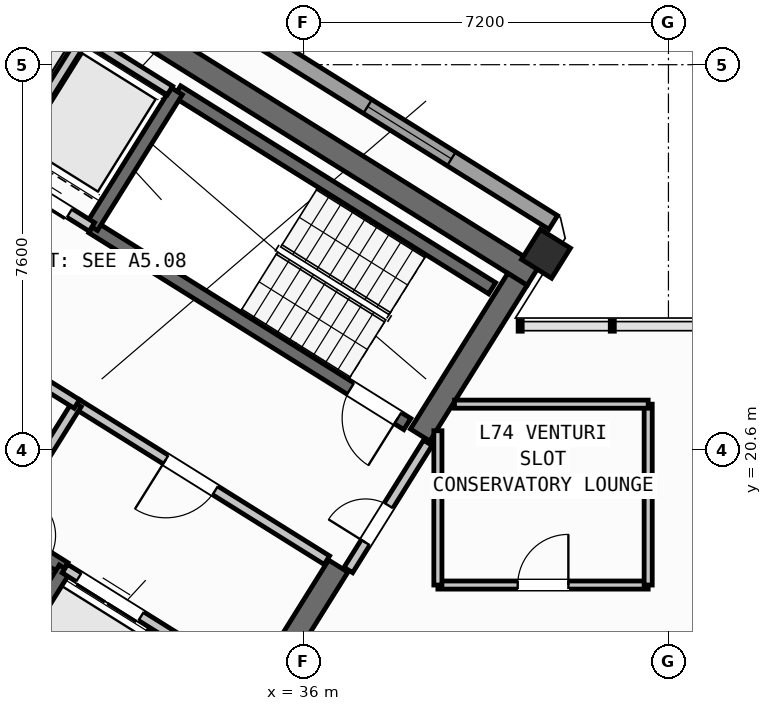
"""IFC4 building model, lengths in metres.
Left out: names, types, materials, properties, quantities, classifications, styles, units other than length and angle.
Written with IfcOpenShell. Run it as: python <this file> out.ifc"""

import sys

from ifc_helpers import new_model, si_unit, direction, frame, frame_2d, origin, origin_2d, place, context, subcontext, project, spatial, rectangle, hollow_rectangle, extrude, source, transform, mapped, element, fill, save


model = new_model("IFC4")
c1 = context("Model", 3, precision=1e-05, world=origin(), true_north=direction((0.0, 1.0)))
c2 = subcontext(c1, "Body", "Model", "MODEL_VIEW")
j1 = project(units=[si_unit("LENGTHUNIT", "METRE"), si_unit("PLANEANGLEUNIT", "RADIAN")], contexts=[c1])
p1 = place(None, origin())
s1 = spatial("IfcSite", under=j1, at=p1, CompositionType="ELEMENT")
p2 = place(p1, origin())
s2 = spatial("IfcBuilding", under=s1, at=p2, CompositionType="ELEMENT")
p3 = place(p2, frame((0.0, 0.0, 291.6)))
s3 = spatial("IfcBuildingStorey", under=s2, at=p3, CompositionType="ELEMENT", Elevation=291.6)
p4 = place(p3, frame((40.531, 24.036, 0.0), z_axis=(0.0, 0.0, 1.0), x_axis=(-0.848048787466, 0.529918157905, 0.0)))
e1 = element("IfcWall", 1, at=p4, inside=s3, PredefinedType="SHEAR", context=c2, shape_type="SweptSolid", body=[
    extrude(rectangle(XDim=13.04, YDim=0.45, at=frame_2d((6.52, 0.0))), origin(), (0.0, 0.0, 1.0), 3.35),
])
p5 = place(p3, frame((33.324, 12.503, 0.0), z_axis=(0.0, 0.0, 1.0), x_axis=(-0.848043529849, 0.529926571782, 0.0)))
e2 = element("IfcWall", 2, at=p5, inside=s3, PredefinedType="SHEAR", context=c2, shape_type="SweptSolid", body=[
    extrude(rectangle(XDim=13.04, YDim=0.45, at=frame_2d((6.52, 0.0))), origin(), (0.0, 0.0, 1.0), 3.35),
])
p6 = place(p3, frame((40.221, 23.965, 0.0), z_axis=(0.0, 0.0, 1.0), x_axis=(-0.529902075036, -0.848058836916, 0.0)))
e3 = element("IfcWall", 3, at=p6, inside=s3, PredefinedType="SHEAR", context=c2, shape_type="SweptSolid", body=[
    extrude(rectangle(XDim=3.625, YDim=0.45, at=frame_2d((1.812, 0.0))), origin(), (0.0, 0.0, 1.0), 3.35),
])
p7 = place(p3, frame((36.683, 18.304, 0.0), z_axis=(0.0, 0.0, 1.0), x_axis=(-0.529904039071, -0.848057609704, 0.0)))
e4 = element("IfcWall", 4, at=p7, inside=s3, PredefinedType="SHEAR", context=c2, shape_type="SweptSolid", body=[
    extrude(rectangle(XDim=6.475, YDim=0.45, at=frame_2d((3.238, 0.0))), origin(), (0.0, 0.0, 1.0), 3.35),
])
m1 = source(origin(), c2, "Body", "SweptSolid", [
    extrude(hollow_rectangle(XDim=0.7, YDim=0.7, WallThickness=0.028, at=origin_2d()), origin(), (0.0, 0.0, 1.0), 3.6),
])
p8 = place(p3, frame((40.783, 24.469, 0.0), z_axis=(0.0, 0.0, 1.0), x_axis=(-0.848048096156, 0.529919264233, 0.0)))
e5 = element("IfcColumn", 5, at=p8, inside=s3, PredefinedType="COLUMN", context=c2, shape_type="MappedRepresentation", body=[
    mapped(m1, transform((0.0, 0.0, 0.0), scale=1.0)),
])
p9 = place(p3, frame((19.566, 38.434, 0.0), z_axis=(0.0, 0.0, 1.0), x_axis=(0.84804567626, -0.529923136858, 0.0)))
e6 = element("IfcWall", 6, at=p9, inside=s3, PredefinedType="STANDARD", context=c2, shape_type="SweptSolid", body=[
    extrude(rectangle(XDim=25.188, YDim=0.32, at=frame_2d((12.594, 0.0))), origin(), (0.0, 0.0, 1.0), 3.35),
])
p10 = place(p9, frame((3.55, 0.0, 0.0)))
e7 = element("IfcOpeningElement", 7, at=p10, cuts=e6, PredefinedType="OPENING", context=c2, shape_type="SweptSolid", body=[
    extrude(rectangle(XDim=1.05, YDim=2.15, at=frame_2d((0.525, 1.075))), frame((0.0, 0.17, 0.0), z_axis=(0.0, -1.0, 0.0), x_axis=(1.0, 0.0, 0.0)), (0.0, 0.0, 1.0), 0.34),
])
p11 = place(p9, frame((7.349, 0.0, 0.9)))
e8 = element("IfcOpeningElement", 8, at=p11, cuts=e6, PredefinedType="OPENING", context=c2, shape_type="SweptSolid", body=[
    extrude(rectangle(XDim=1.65, YDim=1.45, at=frame_2d((0.825, 0.725))), frame((0.0, 0.17, 0.0), z_axis=(0.0, -1.0, 0.0), x_axis=(1.0, 0.0, 0.0)), (0.0, 0.0, 1.0), 0.34),
])
p12 = place(p9, frame((10.754, 0.0, 1.0)))
e9 = element("IfcOpeningElement", 9, at=p12, cuts=e6, PredefinedType="OPENING", context=c2, shape_type="SweptSolid", body=[
    extrude(rectangle(XDim=0.9, YDim=1.25, at=frame_2d((0.45, 0.625))), frame((0.0, 0.17, 0.0), z_axis=(0.0, -1.0, 0.0), x_axis=(1.0, 0.0, 0.0)), (0.0, 0.0, 1.0), 0.34),
])
p13 = place(p9, frame((15.169, 0.0, 0.95)))
e10 = element("IfcOpeningElement", 10, at=p13, cuts=e6, PredefinedType="OPENING", context=c2, shape_type="SweptSolid", body=[
    extrude(rectangle(XDim=1.95, YDim=1.35, at=frame_2d((0.975, 0.675))), frame((0.0, 0.17, 0.0), z_axis=(0.0, -1.0, 0.0), x_axis=(1.0, 0.0, 0.0)), (0.0, 0.0, 1.0), 0.34),
])
p14 = place(p9, frame((20.869, 0.0, 0.95)))
e11 = element("IfcOpeningElement", 11, at=p14, cuts=e6, PredefinedType="OPENING", context=c2, shape_type="SweptSolid", body=[
    extrude(rectangle(XDim=1.95, YDim=1.35, at=frame_2d((0.975, 0.675))), frame((0.0, 0.17, 0.0), z_axis=(0.0, -1.0, 0.0), x_axis=(1.0, 0.0, 0.0)), (0.0, 0.0, 1.0), 0.34),
])
p15 = place(p3, frame((31.28, 18.261, 0.0), z_axis=(0.0, 0.0, 1.0), x_axis=(-0.848051618787, 0.529913626805, 0.0)))
e12 = element("IfcWall", 12, at=p15, inside=s3, PredefinedType="SHEAR", context=c2, shape_type="SweptSolid", body=[
    extrude(rectangle(XDim=7.46, YDim=0.26, at=frame_2d((3.73, 0.0))), origin(), (0.0, 0.0, 1.0), 3.35),
])
p16 = place(p15, frame((0.36, 0.0, 0.0)))
e13 = element("IfcOpeningElement", 13, at=p16, cuts=e12, PredefinedType="OPENING", context=c2, shape_type="SweptSolid", body=[
    extrude(rectangle(XDim=0.86, YDim=2.05, at=frame_2d((0.43, 1.025))), frame((0.0, 0.14, 0.0), z_axis=(0.0, -1.0, 0.0), x_axis=(1.0, 0.0, 0.0)), (0.0, 0.0, 1.0), 0.28),
])
p17 = place(p3, frame((31.288, 18.256, 0.0), z_axis=(0.0, 0.0, 1.0), x_axis=(-0.529943379326, -0.848033026897, 0.0)))
e14 = element("IfcWall", 14, at=p17, inside=s3, PredefinedType="SHEAR", context=c2, shape_type="SweptSolid", body=[
    extrude(rectangle(XDim=3.16, YDim=0.26, at=frame_2d((1.58, 0.0))), origin(), (0.0, 0.0, 1.0), 3.35),
])
p18 = place(p3, frame((39.721, 23.788, 0.0), z_axis=(0.0, 0.0, 1.0), x_axis=(-0.848054434086, 0.529909121291, 0.0)))
e15 = element("IfcWall", 15, at=p18, inside=s3, PredefinedType="SHEAR", context=c2, shape_type="SweptSolid", body=[
    extrude(rectangle(XDim=7.33, YDim=0.26, at=frame_2d((3.665, 0.0))), origin(), (0.0, 0.0, 1.0), 3.35),
])
p19 = place(p3, frame((38.046, 21.108, 0.0), z_axis=(0.0, 0.0, 1.0), x_axis=(-0.848054434086, 0.529909121291, 0.0)))
e16 = element("IfcWall", 16, at=p19, inside=s3, PredefinedType="SHEAR", context=c2, shape_type="SweptSolid", body=[
    extrude(rectangle(XDim=7.33, YDim=0.26, at=frame_2d((3.665, 0.0))), origin(), (0.0, 0.0, 1.0), 3.35),
])
p20 = place(p19, frame((0.22, 0.0, 0.0)))
e17 = element("IfcOpeningElement", 17, at=p20, cuts=e16, PredefinedType="OPENING", context=c2, shape_type="SweptSolid", body=[
    extrude(rectangle(XDim=1.1, YDim=2.1, at=frame_2d((0.55, 1.05))), frame((0.0, 0.14, 0.0), z_axis=(0.0, -1.0, 0.0), x_axis=(1.0, 0.0, 0.0)), (0.0, 0.0, 1.0), 0.28),
])
p21 = place(p3, frame((33.496, 27.677, 0.0), z_axis=(0.0, 0.0, 1.0), x_axis=(-0.529908658664, -0.84805472316, 0.0)))
e18 = element("IfcWall", 18, at=p21, inside=s3, PredefinedType="SHEAR", context=c2, shape_type="SweptSolid", body=[
    extrude(rectangle(XDim=3.16, YDim=0.26, at=frame_2d((1.58, 0.0))), origin(), (0.0, 0.0, 1.0), 3.35),
])
p22 = place(p3, frame((34.933, 15.978, 0.0), z_axis=(0.0, 0.0, 1.0), x_axis=(-0.848055739377, 0.529907032327, 0.0)))
e19 = element("IfcWall", 19, at=p22, inside=s3, PredefinedType="STANDARD", context=c2, shape_type="SweptSolid", body=[
    extrude(rectangle(XDim=4.298, YDim=0.2, at=frame_2d((2.149, 0.0))), origin(), (0.0, 0.0, 1.0), 3.34),
])
p23 = place(p22, frame((0.448, 0.0, 0.0)))
e20 = element("IfcOpeningElement", 20, at=p23, cuts=e19, PredefinedType="OPENING", context=c2, shape_type="SweptSolid", body=[
    extrude(rectangle(XDim=1.3, YDim=2.2, at=frame_2d((0.65, 1.1))), frame((0.0, 0.11, 0.0), z_axis=(0.0, -1.0, 0.0), x_axis=(1.0, 0.0, 0.0)), (0.0, 0.0, 1.0), 0.22),
])
p24 = place(p22, frame((2.523, 0.0, 0.0)))
e21 = element("IfcOpeningElement", 21, at=p24, cuts=e19, PredefinedType="OPENING", context=c2, shape_type="SweptSolid", body=[
    extrude(rectangle(XDim=1.45, YDim=2.25, at=frame_2d((0.725, 1.125))), frame((0.0, 0.11, 0.0), z_axis=(0.0, -1.0, 0.0), x_axis=(1.0, 0.0, 0.0)), (0.0, 0.0, 1.0), 0.22),
])
p25 = place(p3, frame((36.459, 18.421, 0.0), z_axis=(0.0, 0.0, 1.0), x_axis=(-0.848059591691, 0.529900867089, 0.0)))
e22 = element("IfcWall", 22, at=p25, inside=s3, PredefinedType="STANDARD", context=c2, shape_type="SweptSolid", body=[
    extrude(rectangle(XDim=5.818, YDim=0.2, at=frame_2d((2.909, 0.0))), origin(), (0.0, 0.0, 1.0), 3.34),
])
p26 = place(p25, frame((2.598, 0.0, 0.0)))
e23 = element("IfcOpeningElement", 23, at=p26, cuts=e22, PredefinedType="OPENING", context=c2, shape_type="SweptSolid", body=[
    extrude(rectangle(XDim=1.15, YDim=2.1, at=frame_2d((0.575, 1.05))), frame((0.0, 0.11, 0.0), z_axis=(0.0, -1.0, 0.0), x_axis=(1.0, 0.0, 0.0)), (0.0, 0.0, 1.0), 0.22),
])
p27 = place(p3, frame((31.822, 24.998, 0.0), z_axis=(0.0, 0.0, 1.0), x_axis=(-0.848054125777, 0.529909614701, 0.0)))
e24 = element("IfcWall", 24, at=p27, inside=s3, PredefinedType="STANDARD", context=c2, shape_type="SweptSolid", body=[
    extrude(rectangle(XDim=4.668, YDim=0.2, at=frame_2d((2.334, 0.0))), origin(), (0.0, 0.0, 1.0), 3.34),
])
p28 = place(p27, frame((0.52, 0.0, 0.0)))
e25 = element("IfcOpeningElement", 25, at=p28, cuts=e24, PredefinedType="OPENING", context=c2, shape_type="SweptSolid", body=[
    extrude(rectangle(XDim=1.2, YDim=2.15, at=frame_2d((0.6, 1.075))), frame((0.0, 0.11, 0.0), z_axis=(0.0, -1.0, 0.0), x_axis=(1.0, 0.0, 0.0)), (0.0, 0.0, 1.0), 0.22),
])
p29 = place(p27, frame((2.54, 0.0, 0.0)))
e26 = element("IfcOpeningElement", 26, at=p29, cuts=e24, PredefinedType="OPENING", context=c2, shape_type="SweptSolid", body=[
    extrude(rectangle(XDim=1.2, YDim=2.15, at=frame_2d((0.6, 1.075))), frame((0.0, 0.11, 0.0), z_axis=(0.0, -1.0, 0.0), x_axis=(1.0, 0.0, 0.0)), (0.0, 0.0, 1.0), 0.22),
])
p30 = place(p3, frame((33.029, 17.003, 0.0), z_axis=(0.0, 0.0, 1.0), x_axis=(-0.529916267533, -0.848049968695, 0.0)))
e27 = element("IfcWall", 27, at=p30, inside=s3, PredefinedType="STANDARD", context=c2, shape_type="SweptSolid", body=[
    extrude(rectangle(XDim=2.92, YDim=0.2, at=frame_2d((1.46, 0.0))), origin(), (0.0, 0.0, 1.0), 3.34),
])
p31 = place(p3, frame((31.645, 28.716, 0.0), z_axis=(0.0, 0.0, 1.0), x_axis=(-0.52986693015, -0.848080795876, 0.0)))
e28 = element("IfcWall", 28, at=p31, inside=s3, PredefinedType="STANDARD", context=c2, shape_type="SweptSolid", body=[
    extrude(rectangle(XDim=2.66, YDim=0.2, at=frame_2d((1.33, 0.0))), origin(), (0.0, 0.0, 1.0), 3.34),
])
p32 = place(p3, frame((33.363, 27.69, 0.0), z_axis=(0.0, 0.0, 1.0), x_axis=(-0.84804957148, 0.529916903215, 0.0)))
e29 = element("IfcWall", 29, at=p32, inside=s3, PredefinedType="STANDARD", context=c2, shape_type="SweptSolid", body=[
    extrude(rectangle(XDim=4.548, YDim=0.2, at=frame_2d((2.274, 0.0))), origin(), (0.0, 0.0, 1.0), 3.34),
])
p33 = place(p3, frame((31.525, 21.504, 0.0), z_axis=(0.0, 0.0, 1.0), x_axis=(-0.529907497854, -0.848055448493, 0.0)))
e30 = element("IfcWall", 30, at=p33, inside=s3, PredefinedType="STANDARD", context=c2, shape_type="SweptSolid", body=[
    extrude(rectangle(XDim=2.88, YDim=0.2, at=frame_2d((1.44, 0.0))), origin(), (0.0, 0.0, 1.0), 3.34),
])
p34 = place(p3, frame((31.525, 21.504, 0.0), z_axis=(0.0, 0.0, 1.0), x_axis=(-0.848042066329, 0.529928913853, 0.0)))
e31 = element("IfcWall", 31, at=p34, inside=s3, PredefinedType="STANDARD", context=c2, shape_type="SweptSolid", body=[
    extrude(rectangle(XDim=6.268, YDim=0.2, at=frame_2d((3.134, 0.0))), origin(), (0.0, 0.0, 1.0), 3.34),
])
p35 = place(p34, frame((4.4, 0.0, 0.0)))
e32 = element("IfcOpeningElement", 32, at=p35, cuts=e31, PredefinedType="OPENING", context=c2, shape_type="SweptSolid", body=[
    extrude(rectangle(XDim=0.86, YDim=2.05, at=frame_2d((0.43, 1.025))), frame((0.0, 0.11, 0.0), z_axis=(0.0, -1.0, 0.0), x_axis=(1.0, 0.0, 0.0)), (0.0, 0.0, 1.0), 0.22),
])
p36 = place(p34, frame((1.45, 0.0, 0.0)))
e33 = element("IfcOpeningElement", 33, at=p36, cuts=e31, PredefinedType="OPENING", context=c2, shape_type="SweptSolid", body=[
    extrude(rectangle(XDim=0.86, YDim=2.05, at=frame_2d((0.43, 1.025))), frame((0.0, 0.11, 0.0), z_axis=(0.0, -1.0, 0.0), x_axis=(1.0, 0.0, 0.0)), (0.0, 0.0, 1.0), 0.22),
])
p37 = place(p3, frame((32.164, 10.374, 0.0), z_axis=(0.0, 0.0, 1.0), x_axis=(-0.848044107957, 0.529925646633, 0.0)))
e34 = element("IfcWall", 34, at=p37, inside=s3, PredefinedType="PARTITIONING", context=c2, shape_type="SweptSolid", body=[
    extrude(rectangle(XDim=15.57, YDim=0.16, at=frame_2d((7.785, 0.0))), origin(), (0.0, 0.0, 1.0), 3.34),
])
p38 = place(p37, frame((10.83, 0.0, 0.0)))
e35 = element("IfcOpeningElement", 35, at=p38, cuts=e34, PredefinedType="OPENING", context=c2, shape_type="SweptSolid", body=[
    extrude(rectangle(XDim=1.0, YDim=2.1, at=frame_2d((0.5, 1.05))), frame((0.0, 0.09, 0.0), z_axis=(0.0, -1.0, 0.0), x_axis=(1.0, 0.0, 0.0)), (0.0, 0.0, 1.0), 0.18),
])
p39 = place(p3, frame((38.451, 20.737, 0.0), z_axis=(0.0, 0.0, 1.0), x_axis=(-0.529924799939, -0.848044637038, 0.0)))
e36 = element("IfcWall", 36, at=p39, inside=s3, PredefinedType="STANDARD", context=c2, shape_type="SweptSolid", body=[
    extrude(rectangle(XDim=2.96, YDim=0.2, at=frame_2d((1.48, 0.0))), origin(), (0.0, 0.0, 1.0), 3.34),
])
p40 = place(p39, frame((1.46, 0.0, 0.0)))
e37 = element("IfcOpeningElement", 37, at=p40, cuts=e36, PredefinedType="OPENING", context=c2, shape_type="SweptSolid", body=[
    extrude(rectangle(XDim=0.86, YDim=2.05, at=frame_2d((0.43, 1.025))), frame((0.0, 0.11, 0.0), z_axis=(0.0, -1.0, 0.0), x_axis=(1.0, 0.0, 0.0)), (0.0, 0.0, 1.0), 0.22),
])
p41 = place(p3, frame((38.65, 17.93, 0.0), z_axis=(0.0, 0.0, 1.0), x_axis=(1.0, 0.0, 0.0)))
e38 = element("IfcWall", 38, at=p41, inside=s3, PredefinedType="PARTITIONING", context=c2, shape_type="SweptSolid", body=[
    extrude(rectangle(XDim=4.15, YDim=0.16, at=frame_2d((2.075, 0.0))), origin(), (0.0, 0.0, 1.0), 3.34),
])
p42 = place(p41, frame((1.575, 0.0, 0.0)))
e39 = element("IfcOpeningElement", 39, at=p42, cuts=e38, PredefinedType="OPENING", context=c2, shape_type="SweptSolid", body=[
    extrude(rectangle(XDim=1.0, YDim=2.1, at=frame_2d((0.5, 1.05))), frame((0.0, 0.09, 0.0), z_axis=(0.0, -1.0, 0.0), x_axis=(1.0, 0.0, 0.0)), (0.0, 0.0, 1.0), 0.18),
])
p43 = place(p3, frame((38.65, 17.93, 0.0), z_axis=(0.0, 0.0, 1.0), x_axis=(0.0, 1.0, 0.0)))
e40 = element("IfcWall", 40, at=p43, inside=s3, PredefinedType="PARTITIONING", context=c2, shape_type="SweptSolid", body=[
    extrude(rectangle(XDim=3.046, YDim=0.16, at=frame_2d((1.523, 0.0))), origin(), (0.0, 0.0, 1.0), 3.34),
])
p44 = place(p3, frame((42.8, 17.93, 0.0), z_axis=(0.0, 0.0, 1.0), x_axis=(0.0, 1.0, 0.0)))
e41 = element("IfcWall", 41, at=p44, inside=s3, PredefinedType="PARTITIONING", context=c2, shape_type="SweptSolid", body=[
    extrude(rectangle(XDim=3.57, YDim=0.16, at=frame_2d((1.785, 0.0))), origin(), (0.0, 0.0, 1.0), 3.34),
])
p45 = place(p3, frame((38.978, 21.5, 0.0), z_axis=(0.0, 0.0, 1.0), x_axis=(1.0, 0.0, 0.0)))
e42 = element("IfcWall", 42, at=p45, inside=s3, PredefinedType="PARTITIONING", context=c2, shape_type="SweptSolid", body=[
    extrude(rectangle(XDim=3.823, YDim=0.16, at=frame_2d((1.911, 0.0))), origin(), (0.0, 0.0, 1.0), 3.34),
])
m2 = source(origin(), c2, "Body", "SweptSolid", [
    extrude(rectangle(XDim=1.95, YDim=1.35, at=frame_2d((0.975, 0.675))), frame((0.0, 0.03, 0.0), z_axis=(0.0, -1.0, 0.0), x_axis=(1.0, 0.0, 0.0)), (0.0, 0.0, 1.0), 0.06),
])
p46 = place(p14, origin())
e43 = element("IfcWindow", 43, at=p46, inside=s3, PartitioningType="SINGLE_PANEL", PredefinedType="WINDOW", context=c2, shape_type="MappedRepresentation", body=[
    mapped(m2, transform((0.0, 0.0, 0.0), scale=1.0)),
])
fill(e11, e43)
m3 = source(origin(), c2, "Body", "SweptSolid", [
    extrude(rectangle(XDim=1.1, YDim=2.1, at=frame_2d((0.55, 1.05))), frame((0.0, 0.025, 0.0), z_axis=(0.0, -1.0, 0.0), x_axis=(1.0, 0.0, 0.0)), (0.0, 0.0, 1.0), 0.05),
])
p47 = place(p20, origin())
e44 = element("IfcDoor", 44, at=p47, inside=s3, OperationType="SINGLE_SWING_LEFT", PredefinedType="DOOR", context=c2, shape_type="MappedRepresentation", body=[
    mapped(m3, transform((0.0, 0.0, 0.0), scale=1.0)),
])
fill(e17, e44)
m4 = source(origin(), c2, "Body", "SweptSolid", [
    extrude(rectangle(XDim=1.15, YDim=2.1, at=frame_2d((0.575, 1.05))), frame((0.0, 0.025, 0.0), z_axis=(0.0, -1.0, 0.0), x_axis=(1.0, 0.0, 0.0)), (0.0, 0.0, 1.0), 0.05),
])
p48 = place(p26, origin())
e45 = element("IfcDoor", 45, at=p48, inside=s3, OperationType="SINGLE_SWING_RIGHT", PredefinedType="DOOR", context=c2, shape_type="MappedRepresentation", body=[
    mapped(m4, transform((0.0, 0.0, 0.0), scale=1.0)),
])
fill(e23, e45)
m5 = source(origin(), c2, "Body", "SweptSolid", [
    extrude(rectangle(XDim=1.45, YDim=2.25, at=frame_2d((0.725, 1.125))), frame((0.0, 0.025, 0.0), z_axis=(0.0, -1.0, 0.0), x_axis=(1.0, 0.0, 0.0)), (0.0, 0.0, 1.0), 0.05),
])
p49 = place(p24, origin())
e46 = element("IfcDoor", 46, at=p49, inside=s3, OperationType="DOUBLE_DOOR_SLIDING", PredefinedType="DOOR", context=c2, shape_type="MappedRepresentation", body=[
    mapped(m5, transform((0.0, 0.0, 0.0), scale=1.0)),
])
fill(e21, e46)
m6 = source(origin(), c2, "Body", "SweptSolid", [
    extrude(rectangle(XDim=1.2, YDim=2.15, at=frame_2d((0.6, 1.075))), frame((0.0, 0.025, 0.0), z_axis=(0.0, -1.0, 0.0), x_axis=(1.0, 0.0, 0.0)), (0.0, 0.0, 1.0), 0.05),
])
p50 = place(p28, origin())
e47 = element("IfcDoor", 47, at=p50, inside=s3, OperationType="DOUBLE_DOOR_SLIDING", PredefinedType="DOOR", context=c2, shape_type="MappedRepresentation", body=[
    mapped(m6, transform((0.0, 0.0, 0.0), scale=1.0)),
])
fill(e25, e47)
m7 = source(origin(), c2, "Body", "SweptSolid", [
    extrude(rectangle(XDim=1.0, YDim=2.1, at=frame_2d((0.5, 1.05))), frame((0.0, 0.025, 0.0), z_axis=(0.0, -1.0, 0.0), x_axis=(1.0, 0.0, 0.0)), (0.0, 0.0, 1.0), 0.05),
])
p51 = place(p42, origin())
e48 = element("IfcDoor", 48, at=p51, inside=s3, OperationType="SINGLE_SWING_RIGHT", PredefinedType="DOOR", context=c2, shape_type="MappedRepresentation", body=[
    mapped(m7, transform((0.0, 0.0, 0.0), scale=1.0)),
])
fill(e39, e48)
m8 = source(origin(), c2, "Body", "SweptSolid", [
    extrude(rectangle(XDim=0.86, YDim=2.05, at=frame_2d((0.43, 1.025))), frame((0.0, 0.025, 0.0), z_axis=(0.0, -1.0, 0.0), x_axis=(1.0, 0.0, 0.0)), (0.0, 0.0, 1.0), 0.05),
])
p52 = place(p40, frame((0.86, 0.0, 0.0), z_axis=(0.0, 0.0, 1.0), x_axis=(-1.0, 0.0, 0.0)))
e49 = element("IfcDoor", 49, at=p52, inside=s3, OperationType="SINGLE_SWING_LEFT", PredefinedType="DOOR", context=c2, shape_type="MappedRepresentation", body=[
    mapped(m8, transform((0.0, 0.0, 0.0), scale=1.0)),
])
fill(e37, e49)
save(model, sys.argv[1])
